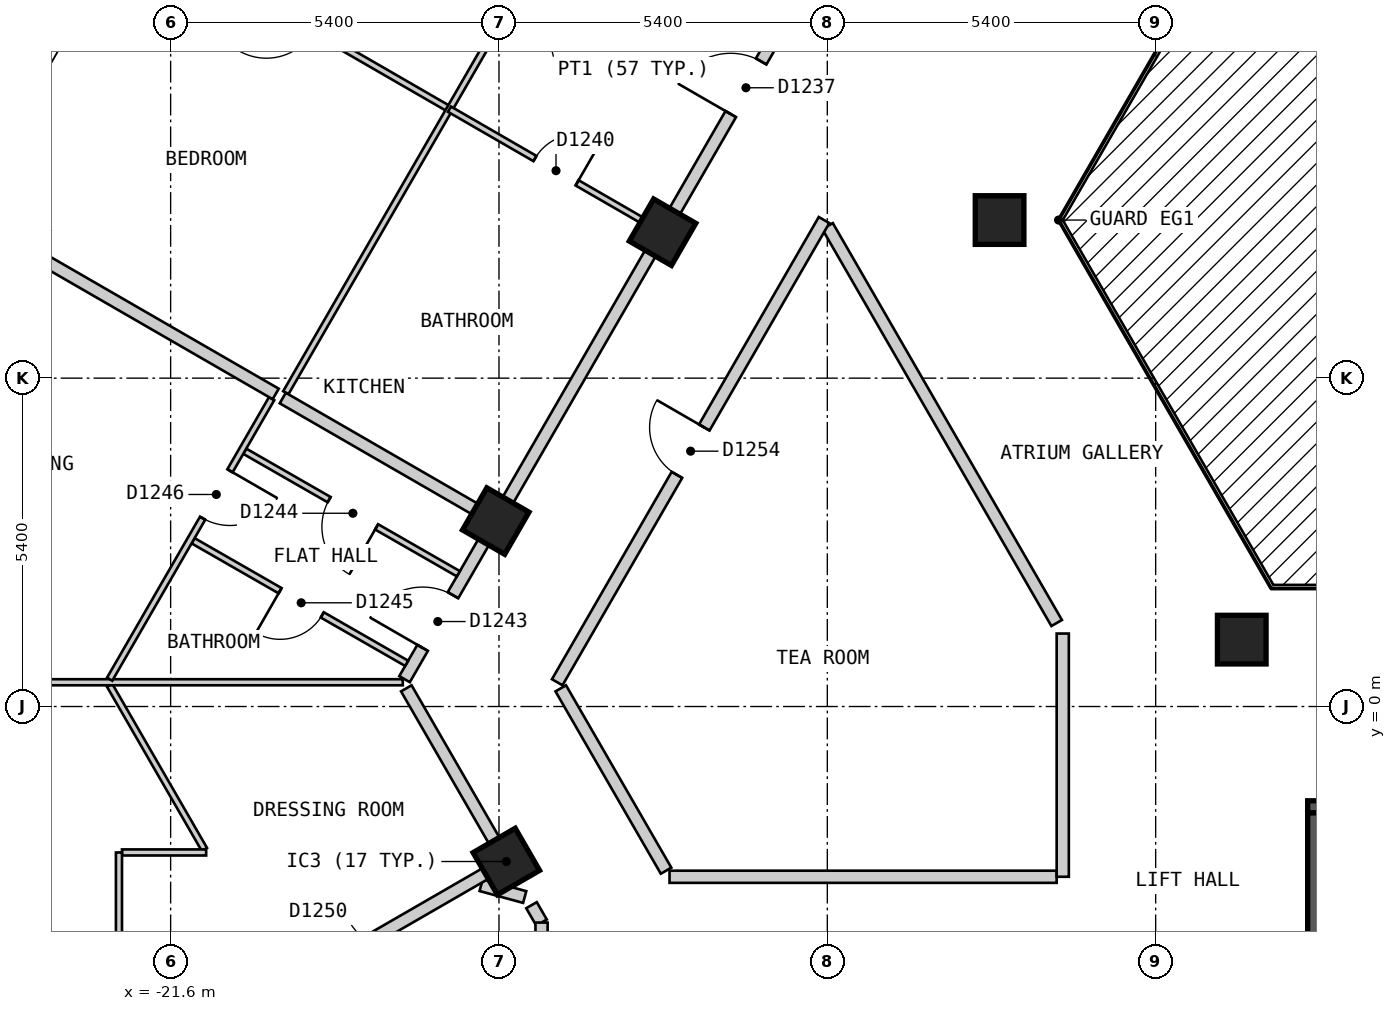
"""IFC4 building model, lengths in metres.
Left out: names, types, materials, properties, quantities, classifications, styles, units other than length and angle.
Written with IfcOpenShell. Run it as: python <this file> out.ifc"""

import sys

from ifc_helpers import new_model, si_unit, direction, frame, frame_2d, origin, origin_2d, place, context, subcontext, project, spatial, polyline, rectangle, outline, extrude, element, fill, save


model = new_model("IFC4")
c1 = context("Model", 3, precision=1e-05, world=origin(), true_north=direction((0.0, 1.0)))
c2 = subcontext(c1, "Body", "Model", "MODEL_VIEW")
j1 = project(units=[si_unit("LENGTHUNIT", "METRE"), si_unit("PLANEANGLEUNIT", "RADIAN")], contexts=[c1])
p1 = place(None, origin())
s1 = spatial("IfcSite", under=j1, at=p1, CompositionType="ELEMENT")
p2 = place(p1, origin())
s2 = spatial("IfcBuilding", under=s1, at=p2, CompositionType="ELEMENT")
p3 = place(p2, frame((0.0, 0.0, 129.6)))
s3 = spatial("IfcBuildingStorey", under=s2, at=p3, CompositionType="ELEMENT", Elevation=129.6)
for number, where, z_axis, x_axis in (
    (1, (-16.079, -2.549, 0.0), (0.0, 0.0, 1.0), (0.5, -0.866, 0.0)),
    (2, (-7.967, 8.0, 0.0), (0.0, 0.0, 1.0), (1.0, 0.0, 0.0)),
    (3, (-13.51, 7.8, 0.0), (0.0, 0.0, 1.0), (-0.5, -0.866, 0.0)),
    (4, (-3.984, 1.1, 0.0), (0.0, 0.0, 1.0), (1.0, 0.0, 0.0)),
    (5, (-16.253, 3.05, 0.0), (0.0, 0.0, 1.0), (-0.5, -0.866, 0.0)),
):
    element("IfcColumn", number, at=place(p3, frame(where, z_axis=z_axis, x_axis=x_axis)), inside=s3, PredefinedType="COLUMN", context=c2, shape_type="SweptSolid", body=[
        extrude(rectangle(XDim=0.8, YDim=0.8, at=origin_2d()), origin(), (0.0, 0.0, 1.0), 3.0),
    ])
p4 = place(p3, frame((-16.555, 23.025, 0.0), z_axis=(0.0, 0.0, 1.0), x_axis=(-0.500020536353, -0.866013546791, 0.0)))
e6 = element("IfcWall", 6, at=p4, inside=s3, PredefinedType="SOLIDWALL", context=c2, shape_type="SweptSolid", body=[
    extrude(outline(polyline([(0.0, -0.15), (23.325, -0.15), (23.245, 0.15), (0.08, 0.15), (0.0, -0.15)])), origin(), (0.0, 0.0, 1.0), 2.7),
])
p5 = place(p4, frame((2.685, 0.0, 0.15)))
e7 = element("IfcOpeningElement", 7, at=p5, cuts=e6, PredefinedType="OPENING", context=c2, shape_type="SweptSolid", body=[
    extrude(rectangle(XDim=1.5, YDim=2.1, at=frame_2d((0.75, 1.05))), frame((0.0, 0.16, 0.0), z_axis=(0.0, -1.0, 0.0), x_axis=(1.0, 0.0, 0.0)), (0.0, 0.0, 1.0), 0.32),
])
p6 = place(p4, frame((8.171, 0.0, 0.15)))
e8 = element("IfcOpeningElement", 8, at=p6, cuts=e6, PredefinedType="OPENING", context=c2, shape_type="SweptSolid", body=[
    extrude(rectangle(XDim=1.5, YDim=2.1, at=frame_2d((0.75, 1.05))), frame((0.0, 0.16, 0.0), z_axis=(0.0, -1.0, 0.0), x_axis=(1.0, 0.0, 0.0)), (0.0, 0.0, 1.0), 0.32),
])
p7 = place(p4, frame((13.655, 0.0, 0.15)))
e9 = element("IfcOpeningElement", 9, at=p7, cuts=e6, PredefinedType="OPENING", context=c2, shape_type="SweptSolid", body=[
    extrude(rectangle(XDim=1.5, YDim=2.1, at=frame_2d((0.75, 1.05))), frame((0.0, 0.16, 0.0), z_axis=(0.0, -1.0, 0.0), x_axis=(1.0, 0.0, 0.0)), (0.0, 0.0, 1.0), 0.32),
])
p8 = place(p4, frame((19.14, 0.0, 0.15)))
e10 = element("IfcOpeningElement", 10, at=p8, cuts=e6, PredefinedType="OPENING", context=c2, shape_type="SweptSolid", body=[
    extrude(rectangle(XDim=1.5, YDim=2.1, at=frame_2d((0.75, 1.05))), frame((0.0, 0.16, 0.0), z_axis=(0.0, -1.0, 0.0), x_axis=(1.0, 0.0, 0.0)), (0.0, 0.0, 1.0), 0.32),
])
p9 = place(p3, frame((-28.218, -2.025, 0.0), z_axis=(0.0, 0.0, 1.0), x_axis=(0.500017503135, -0.866015298109, 0.0)))
e11 = element("IfcWall", 11, at=p9, inside=s3, PredefinedType="SOLIDWALL", context=c2, shape_type="SweptSolid", body=[
    extrude(outline(polyline([(0.0, -0.15), (24.711, -0.15), (24.631, 0.15), (0.08, 0.15), (0.0, -0.15)])), origin(), (0.0, 0.0, 1.0), 2.7),
])
p10 = place(p9, frame((2.857, 0.0, 0.15)))
e12 = element("IfcOpeningElement", 12, at=p10, cuts=e11, PredefinedType="OPENING", context=c2, shape_type="SweptSolid", body=[
    extrude(rectangle(XDim=1.5, YDim=2.1, at=frame_2d((0.75, 1.05))), frame((0.0, 0.16, 0.0), z_axis=(0.0, -1.0, 0.0), x_axis=(1.0, 0.0, 0.0)), (0.0, 0.0, 1.0), 0.32),
])
p11 = place(p9, frame((8.689, 0.0, 0.15)))
e13 = element("IfcOpeningElement", 13, at=p11, cuts=e11, PredefinedType="OPENING", context=c2, shape_type="SweptSolid", body=[
    extrude(rectangle(XDim=1.5, YDim=2.1, at=frame_2d((0.75, 1.05))), frame((0.0, 0.16, 0.0), z_axis=(0.0, -1.0, 0.0), x_axis=(1.0, 0.0, 0.0)), (0.0, 0.0, 1.0), 0.32),
])
p12 = place(p9, frame((14.52, 0.0, 0.15)))
e14 = element("IfcOpeningElement", 14, at=p12, cuts=e11, PredefinedType="OPENING", context=c2, shape_type="SweptSolid", body=[
    extrude(rectangle(XDim=1.5, YDim=2.1, at=frame_2d((0.75, 1.05))), frame((0.0, 0.16, 0.0), z_axis=(0.0, -1.0, 0.0), x_axis=(1.0, 0.0, 0.0)), (0.0, 0.0, 1.0), 0.32),
])
p13 = place(p9, frame((20.351, 0.0, 0.15)))
e15 = element("IfcOpeningElement", 15, at=p13, cuts=e11, PredefinedType="OPENING", context=c2, shape_type="SweptSolid", body=[
    extrude(rectangle(XDim=1.5, YDim=2.1, at=frame_2d((0.75, 1.05))), frame((0.0, 0.16, 0.0), z_axis=(0.0, -1.0, 0.0), x_axis=(1.0, 0.0, 0.0)), (0.0, 0.0, 1.0), 0.32),
])
p14 = place(p3, frame((-2.9, -1.65, 0.0), z_axis=(0.0, 0.0, 1.0), x_axis=(1.0, 0.0, 0.0)))
e16 = element("IfcWall", 16, at=p14, inside=s3, PredefinedType="SOLIDWALL", context=c2, shape_type="SweptSolid", body=[
    extrude(rectangle(XDim=5.8, YDim=0.2, at=frame_2d((2.9, 0.0))), origin(), (0.0, 0.0, 1.0), 2.7),
])
p15 = place(p14, frame((0.3, 0.0, 0.0)))
e17 = element("IfcOpeningElement", 17, at=p15, cuts=e16, PredefinedType="OPENING", context=c2, shape_type="SweptSolid", body=[
    extrude(rectangle(XDim=1.2, YDim=2.1, at=frame_2d((0.6, 1.05))), frame((0.0, 0.11, 0.0), z_axis=(0.0, -1.0, 0.0), x_axis=(1.0, 0.0, 0.0)), (0.0, 0.0, 1.0), 0.22),
])
p16 = place(p3, frame((-2.8, -4.5, 0.0), z_axis=(0.0, 0.0, 1.0), x_axis=(0.0, 1.0, 0.0)))
e18 = element("IfcWall", 18, at=p16, inside=s3, PredefinedType="SOLIDWALL", context=c2, shape_type="SweptSolid", body=[
    extrude(rectangle(XDim=2.75, YDim=0.2, at=frame_2d((1.375, 0.0))), origin(), (0.0, 0.0, 1.0), 2.7),
])
p17 = place(p3, frame((-10.796, 7.9, 0.0), z_axis=(0.0, 0.0, 1.0), x_axis=(0.499954271211, -0.866051803703, 0.0)))
e19 = element("IfcWall", 19, at=p17, inside=s3, PredefinedType="PARTITIONING", context=c2, shape_type="SweptSolid", body=[
    extrude(rectangle(XDim=7.536, YDim=0.2, at=frame_2d((3.768, 0.0))), origin(), (0.0, 0.0, 1.0), 2.7),
])
p18 = place(p3, frame((-15.184, 0.299, 0.0), z_axis=(0.0, 0.0, 1.0), x_axis=(0.500149577091, -0.865939028186, 0.0)))
e20 = element("IfcWall", 20, at=p18, inside=s3, PredefinedType="PARTITIONING", context=c2, shape_type="SweptSolid", body=[
    extrude(rectangle(XDim=3.463, YDim=0.2, at=frame_2d((1.732, 0.0))), origin(), (0.0, 0.0, 1.0), 2.7),
])
p19 = place(p3, frame((-17.724, 0.299, 0.0), z_axis=(0.0, 0.0, 1.0), x_axis=(0.499910220442, -0.866077231832, 0.0)))
e21 = element("IfcWall", 21, at=p19, inside=s3, PredefinedType="PARTITIONING", context=c2, shape_type="SweptSolid", body=[
    extrude(rectangle(XDim=3.189, YDim=0.2, at=frame_2d((1.594, 0.0))), origin(), (0.0, 0.0, 1.0), 2.7),
])
p20 = place(p3, frame((-15.665, -3.267, 0.0), z_axis=(0.0, 0.0, 1.0), x_axis=(0.499957196903, -0.866050114754, 0.0)))
e22 = element("IfcWall", 22, at=p20, inside=s3, PredefinedType="PARTITIONING", context=c2, shape_type="SweptSolid", body=[
    extrude(rectangle(XDim=0.33, YDim=0.2, at=frame_2d((0.165, 0.0))), origin(), (0.0, 0.0, 1.0), 2.7),
])
p21 = place(p3, frame((-13.395, -2.8, 0.0), z_axis=(0.0, 0.0, 1.0), x_axis=(1.0, 0.0, 0.0)))
e23 = element("IfcWall", 23, at=p21, inside=s3, PredefinedType="PARTITIONING", context=c2, shape_type="SweptSolid", body=[
    extrude(rectangle(XDim=6.367, YDim=0.2, at=frame_2d((3.184, 0.0))), origin(), (0.0, 0.0, 1.0), 2.7),
])
p22 = place(p3, frame((-15.242, 0.399, 0.0), z_axis=(0.0, 0.0, 1.0), x_axis=(0.499953615651, 0.866052182145, 0.0)))
e24 = element("IfcWall", 24, at=p22, inside=s3, PredefinedType="PARTITIONING", context=c2, shape_type="SweptSolid", body=[
    extrude(rectangle(XDim=8.777, YDim=0.2, at=frame_2d((4.388, 0.0))), origin(), (0.0, 0.0, 1.0), 2.7),
])
p23 = place(p22, frame((3.938, 0.0, 0.0)))
e25 = element("IfcOpeningElement", 25, at=p23, cuts=e24, PredefinedType="OPENING", context=c2, shape_type="SweptSolid", body=[
    extrude(rectangle(XDim=0.9, YDim=2.1, at=frame_2d((0.45, 1.05))), frame((0.0, 0.11, 0.0), z_axis=(0.0, -1.0, 0.0), x_axis=(1.0, 0.0, 0.0)), (0.0, 0.0, 1.0), 0.22),
])
p24 = place(p3, frame((-17.753, 0.45, 0.0), z_axis=(0.0, 0.0, 1.0), x_axis=(0.499988552313, 0.866032013009, 0.0)))
e26 = element("IfcWall", 26, at=p24, inside=s3, PredefinedType="PARTITIONING", context=c2, shape_type="SweptSolid", body=[
    extrude(rectangle(XDim=16.917, YDim=0.2, at=frame_2d((8.458, 0.0))), origin(), (0.0, 0.0, 1.0), 2.7),
])
p25 = place(p24, frame((10.73, 0.0, 0.0)))
e27 = element("IfcOpeningElement", 27, at=p25, cuts=e26, PredefinedType="OPENING", context=c2, shape_type="SweptSolid", body=[
    extrude(rectangle(XDim=1.0, YDim=2.1, at=frame_2d((0.5, 1.05))), frame((0.0, 0.11, 0.0), z_axis=(0.0, -1.0, 0.0), x_axis=(1.0, 0.0, 0.0)), (0.0, 0.0, 1.0), 0.22),
])
p26 = place(p24, frame((0.594, 0.0, 0.0)))
e28 = element("IfcOpeningElement", 28, at=p26, cuts=e26, PredefinedType="OPENING", context=c2, shape_type="SweptSolid", body=[
    extrude(rectangle(XDim=1.0, YDim=2.1, at=frame_2d((0.5, 1.05))), frame((0.0, 0.11, 0.0), z_axis=(0.0, -1.0, 0.0), x_axis=(1.0, 0.0, 0.0)), (0.0, 0.0, 1.0), 0.22),
])
p27 = place(p3, frame((-6.928, -2.8, 0.0), z_axis=(0.0, 0.0, 1.0), x_axis=(0.0, 1.0, 0.0)))
e29 = element("IfcWall", 29, at=p27, inside=s3, PredefinedType="PARTITIONING", context=c2, shape_type="SweptSolid", body=[
    extrude(rectangle(XDim=4.0, YDim=0.2, at=frame_2d((2.0, 0.0))), origin(), (0.0, 0.0, 1.0), 2.7),
])
p28 = place(p3, frame((-15.5, -6.6, 0.0), z_axis=(0.0, 0.0, 1.0), x_axis=(0.0, 1.0, 0.0)))
e30 = element("IfcWall", 30, at=p28, inside=s3, PredefinedType="PARTITIONING", context=c2, shape_type="SweptSolid", body=[
    extrude(rectangle(XDim=3.047, YDim=0.2, at=frame_2d((1.523, 0.0))), origin(), (0.0, 0.0, 1.0), 2.7),
])
p29 = place(p3, frame((-22.603, 0.349, 0.0), z_axis=(0.0, 0.0, 1.0), x_axis=(0.499930403552, -0.866065581584, 0.0)))
e31 = element("IfcWall", 31, at=p29, inside=s3, PredefinedType="PARTITIONING", context=c2, shape_type="SweptSolid", body=[
    extrude(rectangle(XDim=3.117, YDim=0.1, at=frame_2d((1.558, 0.0))), origin(), (0.0, 0.0, 1.0), 2.7),
])
p30 = place(p3, frame((-20.381, 4.198, 0.0), z_axis=(0.0, 0.0, 1.0), x_axis=(0.867459321792, -0.497508115549, 0.0)))
e32 = element("IfcWall", 32, at=p30, inside=s3, PredefinedType="PARTITIONING", context=c2, shape_type="SweptSolid", body=[
    extrude(rectangle(XDim=4.05, YDim=0.1, at=frame_2d((2.025, 0.0))), origin(), (0.0, 0.0, 1.0), 2.7),
])
p31 = place(p30, frame((1.6, 0.0, 0.0)))
e33 = element("IfcOpeningElement", 33, at=p31, cuts=e32, PredefinedType="OPENING", context=c2, shape_type="SweptSolid", body=[
    extrude(rectangle(XDim=0.9, YDim=2.1, at=frame_2d((0.45, 1.05))), frame((0.0, 0.06, 0.0), z_axis=(0.0, -1.0, 0.0), x_axis=(1.0, 0.0, 0.0)), (0.0, 0.0, 1.0), 0.12),
])
p32 = place(p3, frame((-21.231, 2.726, 0.0), z_axis=(0.0, 0.0, 1.0), x_axis=(0.867314299312, -0.497760892607, 0.0)))
e34 = element("IfcWall", 34, at=p32, inside=s3, PredefinedType="PARTITIONING", context=c2, shape_type="SweptSolid", body=[
    extrude(rectangle(XDim=4.05, YDim=0.1, at=frame_2d((2.025, 0.0))), origin(), (0.0, 0.0, 1.0), 2.7),
])
p33 = place(p32, frame((1.65, 0.0, 0.0)))
e35 = element("IfcOpeningElement", 35, at=p33, cuts=e34, PredefinedType="OPENING", context=c2, shape_type="SweptSolid", body=[
    extrude(rectangle(XDim=0.8, YDim=2.1, at=frame_2d((0.4, 1.05))), frame((0.0, 0.06, 0.0), z_axis=(0.0, -1.0, 0.0), x_axis=(1.0, 0.0, 0.0)), (0.0, 0.0, 1.0), 0.12),
])
p34 = place(p3, frame((-22.257, 12.85, 0.0), z_axis=(0.0, 0.0, 1.0), x_axis=(0.866028448709, -0.499994725999, 0.0)))
e36 = element("IfcWall", 36, at=p34, inside=s3, PredefinedType="PARTITIONING", context=c2, shape_type="SweptSolid", body=[
    extrude(rectangle(XDim=6.054, YDim=0.1, at=frame_2d((3.027, 0.0))), origin(), (0.0, 0.0, 1.0), 2.7),
])
p35 = place(p34, frame((2.577, 0.0, 0.0)))
e37 = element("IfcOpeningElement", 37, at=p35, cuts=e36, PredefinedType="OPENING", context=c2, shape_type="SweptSolid", body=[
    extrude(rectangle(XDim=0.9, YDim=2.1, at=frame_2d((0.45, 1.05))), frame((0.0, 0.06, 0.0), z_axis=(0.0, -1.0, 0.0), x_axis=(1.0, 0.0, 0.0)), (0.0, 0.0, 1.0), 0.12),
])
p36 = place(p3, frame((-22.4, -2.4, 0.0), z_axis=(0.0, 0.0, 1.0), x_axis=(1.0, 0.0, 0.0)))
e38 = element("IfcWall", 38, at=p36, inside=s3, PredefinedType="PARTITIONING", context=c2, shape_type="SweptSolid", body=[
    extrude(rectangle(XDim=1.384, YDim=0.1, at=frame_2d((0.692, 0.0))), origin(), (0.0, 0.0, 1.0), 2.7),
])
p37 = place(p3, frame((-28.048, 0.399, 0.0), z_axis=(0.0, 0.0, 1.0), x_axis=(1.0, 0.0, 0.0)))
e39 = element("IfcWall", 39, at=p37, inside=s3, PredefinedType="PARTITIONING", context=c2, shape_type="SweptSolid", body=[
    extrude(rectangle(XDim=10.266, YDim=0.1, at=frame_2d((5.133, 0.0))), origin(), (0.0, 0.0, 1.0), 2.7),
])
p38 = place(p37, frame((2.258, 0.0, 0.0)))
e40 = element("IfcOpeningElement", 40, at=p38, cuts=e39, PredefinedType="OPENING", context=c2, shape_type="SweptSolid", body=[
    extrude(rectangle(XDim=0.9, YDim=2.1, at=frame_2d((0.45, 1.05))), frame((0.0, 0.06, 0.0), z_axis=(0.0, -1.0, 0.0), x_axis=(1.0, 0.0, 0.0)), (0.0, 0.0, 1.0), 0.12),
])
p39 = place(p3, frame((-19.706, 5.16, 0.0), z_axis=(0.0, 0.0, 1.0), x_axis=(0.500003799672, 0.866023210032, 0.0)))
e41 = element("IfcWall", 41, at=p39, inside=s3, PredefinedType="PARTITIONING", context=c2, shape_type="SweptSolid", body=[
    extrude(rectangle(XDim=16.15, YDim=0.1, at=frame_2d((8.075, 0.0))), origin(), (0.0, 0.0, 1.0), 2.7),
])
p40 = place(p39, frame((7.677, 0.0, 0.0)))
e42 = element("IfcOpeningElement", 42, at=p40, cuts=e41, PredefinedType="OPENING", context=c2, shape_type="SweptSolid", body=[
    extrude(rectangle(XDim=0.9, YDim=2.1, at=frame_2d((0.45, 1.05))), frame((0.0, 0.06, 0.0), z_axis=(0.0, -1.0, 0.0), x_axis=(1.0, 0.0, 0.0)), (0.0, 0.0, 1.0), 0.12),
])
p41 = place(p3, frame((-22.603, 0.449, 0.0), z_axis=(0.0, 0.0, 1.0), x_axis=(0.500022588228, 0.866012362072, 0.0)))
e43 = element("IfcWall", 43, at=p41, inside=s3, PredefinedType="PARTITIONING", context=c2, shape_type="SweptSolid", body=[
    extrude(rectangle(XDim=5.328, YDim=0.1, at=frame_2d((2.664, 0.0))), origin(), (0.0, 0.0, 1.0), 2.7),
])
p42 = place(p41, frame((3.058, 0.0, 0.0)))
e44 = element("IfcOpeningElement", 44, at=p42, cuts=e43, PredefinedType="OPENING", context=c2, shape_type="SweptSolid", body=[
    extrude(rectangle(XDim=0.9, YDim=2.1, at=frame_2d((0.45, 1.05))), frame((0.0, 0.06, 0.0), z_axis=(0.0, -1.0, 0.0), x_axis=(1.0, 0.0, 0.0)), (0.0, 0.0, 1.0), 0.12),
])
p43 = place(p3, frame((-22.45, -6.112, 0.0), z_axis=(0.0, 0.0, 1.0), x_axis=(0.0, 1.0, 0.0)))
e45 = element("IfcWall", 45, at=p43, inside=s3, PredefinedType="PARTITIONING", context=c2, shape_type="SweptSolid", body=[
    extrude(rectangle(XDim=3.712, YDim=0.1, at=frame_2d((1.856, 0.0))), origin(), (0.0, 0.0, 1.0), 2.7),
])
p44 = place(p43, frame((1.398, 0.0, 0.0)))
e46 = element("IfcOpeningElement", 46, at=p44, cuts=e45, PredefinedType="OPENING", context=c2, shape_type="SweptSolid", body=[
    extrude(rectangle(XDim=0.8, YDim=2.1, at=frame_2d((0.4, 1.05))), frame((0.0, 0.06, 0.0), z_axis=(0.0, -1.0, 0.0), x_axis=(1.0, 0.0, 0.0)), (0.0, 0.0, 1.0), 0.12),
])
p45 = place(p3, frame((-16.493, -2.938, 0.0), z_axis=(0.0, 0.0, 1.0), x_axis=(0.964816958114, -0.262922493019, 0.0)))
e47 = element("IfcWall", 47, at=p45, inside=s3, PredefinedType="PARTITIONING", context=c2, shape_type="SweptSolid", body=[
    extrude(rectangle(XDim=0.742, YDim=0.2, at=frame_2d((0.371, 0.0))), origin(), (0.0, 0.0, 1.0), 2.7),
])
p46 = place(p3, frame((-24.999, 8.1, 0.0), z_axis=(0.0, 0.0, 1.0), x_axis=(0.866013897511, -0.50001992892, 0.0)))
e48 = element("IfcWall", 48, at=p46, inside=s3, PredefinedType="PARTITIONING", context=c2, shape_type="SweptSolid", body=[
    extrude(rectangle(XDim=5.92, YDim=0.2, at=frame_2d((2.96, 0.0))), origin(), (0.0, 0.0, 1.0), 2.7),
])
p47 = place(p3, frame((-19.756, 5.073, 0.0), z_axis=(0.0, 0.0, 1.0), x_axis=(0.866014535457, -0.500018824023, 0.0)))
e49 = element("IfcWall", 49, at=p47, inside=s3, PredefinedType="PARTITIONING", context=c2, shape_type="SweptSolid", body=[
    extrude(rectangle(XDim=3.946, YDim=0.2, at=frame_2d((1.973, 0.0))), origin(), (0.0, 0.0, 1.0), 2.7),
])
p48 = place(p3, frame((-24.826, -7.599, 0.0), z_axis=(0.0, 0.0, 1.0), x_axis=(0.86599621094, 0.500050560081, 0.0)))
e50 = element("IfcWall", 50, at=p48, inside=s3, PredefinedType="PARTITIONING", context=c2, shape_type="SweptSolid", body=[
    extrude(rectangle(XDim=10.069, YDim=0.2, at=frame_2d((5.035, 0.0))), origin(), (0.0, 0.0, 1.0), 2.7),
])
p49 = place(p3, frame((-17.014, 9.823, 0.0), z_axis=(0.0, 0.0, 1.0), x_axis=(0.866076396086, -0.499911668341, 0.0)))
e51 = element("IfcWall", 51, at=p49, inside=s3, PredefinedType="PARTITIONING", context=c2, shape_type="SweptSolid", body=[
    extrude(rectangle(XDim=3.947, YDim=0.1, at=frame_2d((1.973, 0.0))), origin(), (0.0, 0.0, 1.0), 2.7),
])
p50 = place(p49, frame((1.623, 0.0, 0.0)))
e52 = element("IfcOpeningElement", 52, at=p50, cuts=e51, PredefinedType="OPENING", context=c2, shape_type="SweptSolid", body=[
    extrude(rectangle(XDim=0.8, YDim=2.1, at=frame_2d((0.4, 1.05))), frame((0.0, 0.06, 0.0), z_axis=(0.0, -1.0, 0.0), x_axis=(1.0, 0.0, 0.0)), (0.0, 0.0, 1.0), 0.12),
])
p51 = place(p7, origin())
e53 = element("IfcWindow", 53, at=p51, inside=s3, PartitioningType="SINGLE_PANEL", PredefinedType="WINDOW", context=c2, shape_type="SweptSolid", body=[
    extrude(rectangle(XDim=1.5, YDim=2.1, at=frame_2d((0.75, 1.05))), frame((0.0, 0.03, 0.0), z_axis=(0.0, -1.0, 0.0), x_axis=(1.0, 0.0, 0.0)), (0.0, 0.0, 1.0), 0.06),
])
fill(e9, e53)
p52 = place(p25, origin())
e54 = element("IfcDoor", 54, at=p52, inside=s3, OperationType="SINGLE_SWING_LEFT", PredefinedType="DOOR", context=c2, shape_type="SweptSolid", body=[
    extrude(rectangle(XDim=1.0, YDim=2.1, at=frame_2d((0.5, 1.05))), frame((0.0, 0.025, 0.0), z_axis=(0.0, -1.0, 0.0), x_axis=(1.0, 0.0, 0.0)), (0.0, 0.0, 1.0), 0.05),
])
fill(e27, e54)
p53 = place(p50, origin())
e55 = element("IfcDoor", 55, at=p53, inside=s3, OperationType="SINGLE_SWING_RIGHT", PredefinedType="DOOR", context=c2, shape_type="SweptSolid", body=[
    extrude(rectangle(XDim=0.8, YDim=2.1, at=frame_2d((0.4, 1.05))), frame((0.0, 0.025, 0.0), z_axis=(0.0, -1.0, 0.0), x_axis=(1.0, 0.0, 0.0)), (0.0, 0.0, 1.0), 0.05),
])
fill(e52, e55)
p54 = place(p26, origin())
e56 = element("IfcDoor", 56, at=p54, inside=s3, OperationType="SINGLE_SWING_LEFT", PredefinedType="DOOR", context=c2, shape_type="SweptSolid", body=[
    extrude(rectangle(XDim=1.0, YDim=2.1, at=frame_2d((0.5, 1.05))), frame((0.0, 0.025, 0.0), z_axis=(0.0, -1.0, 0.0), x_axis=(1.0, 0.0, 0.0)), (0.0, 0.0, 1.0), 0.05),
])
fill(e28, e56)
p55 = place(p31, origin())
e57 = element("IfcDoor", 57, at=p55, inside=s3, OperationType="SINGLE_SWING_RIGHT", PredefinedType="DOOR", context=c2, shape_type="SweptSolid", body=[
    extrude(rectangle(XDim=0.9, YDim=2.1, at=frame_2d((0.45, 1.05))), frame((0.0, 0.025, 0.0), z_axis=(0.0, -1.0, 0.0), x_axis=(1.0, 0.0, 0.0)), (0.0, 0.0, 1.0), 0.05),
])
fill(e33, e57)
p56 = place(p33, origin())
e58 = element("IfcDoor", 58, at=p56, inside=s3, OperationType="SINGLE_SWING_LEFT", PredefinedType="DOOR", context=c2, shape_type="SweptSolid", body=[
    extrude(rectangle(XDim=0.8, YDim=2.1, at=frame_2d((0.4, 1.05))), frame((0.0, 0.025, 0.0), z_axis=(0.0, -1.0, 0.0), x_axis=(1.0, 0.0, 0.0)), (0.0, 0.0, 1.0), 0.05),
])
fill(e35, e58)
p57 = place(p42, origin())
e59 = element("IfcDoor", 59, at=p57, inside=s3, OperationType="SINGLE_SWING_RIGHT", PredefinedType="DOOR", context=c2, shape_type="SweptSolid", body=[
    extrude(rectangle(XDim=0.9, YDim=2.1, at=frame_2d((0.45, 1.05))), frame((0.0, 0.025, 0.0), z_axis=(0.0, -1.0, 0.0), x_axis=(1.0, 0.0, 0.0)), (0.0, 0.0, 1.0), 0.05),
])
fill(e44, e59)
p58 = place(p23, origin())
e60 = element("IfcDoor", 60, at=p58, inside=s3, OperationType="SINGLE_SWING_RIGHT", PredefinedType="DOOR", context=c2, shape_type="SweptSolid", body=[
    extrude(rectangle(XDim=0.9, YDim=2.1, at=frame_2d((0.45, 1.05))), frame((0.0, 0.025, 0.0), z_axis=(0.0, -1.0, 0.0), x_axis=(1.0, 0.0, 0.0)), (0.0, 0.0, 1.0), 0.05),
])
fill(e25, e60)
save(model, sys.argv[1])
